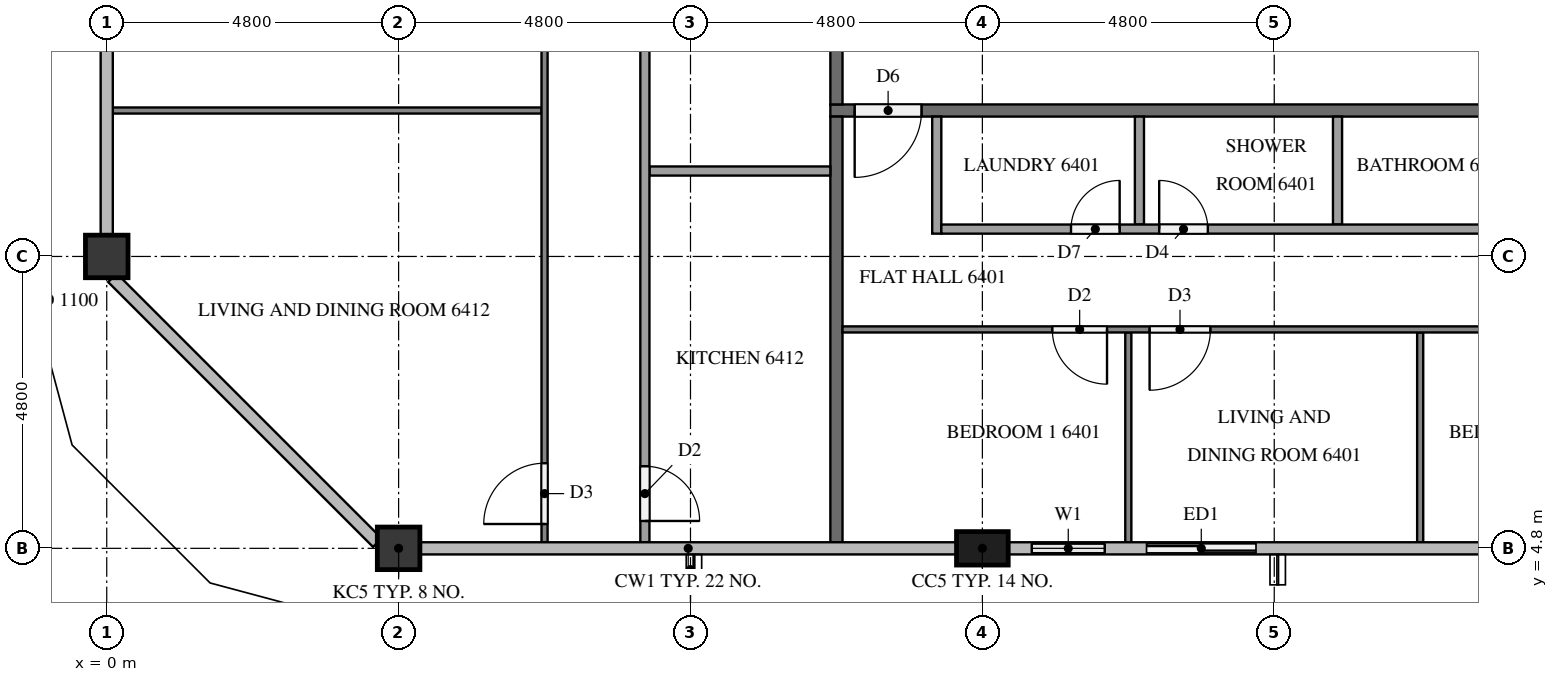
"""IFC4 building model, lengths in metres.
Left out: names, types, materials, properties, quantities, classifications, styles, units other than length and angle.
Written with IfcOpenShell. Run it as: python <this file> out.ifc"""

import sys

from ifc_helpers import new_model, si_unit, direction, frame, frame_2d, origin, origin_2d, place, context, subcontext, project, spatial, rectangle, extrude, element, fill, save


model = new_model("IFC4")
c1 = context("Model", 3, precision=1e-05, world=origin(), true_north=direction((0.0, 1.0)))
c2 = subcontext(c1, "Body", "Model", "MODEL_VIEW")
j1 = project(units=[si_unit("LENGTHUNIT", "METRE"), si_unit("PLANEANGLEUNIT", "RADIAN")], contexts=[c1])
p1 = place(None, origin())
s1 = spatial("IfcSite", under=j1, at=p1, CompositionType="ELEMENT")
p2 = place(p1, origin())
s2 = spatial("IfcBuilding", under=s1, at=p2, CompositionType="ELEMENT")
p3 = place(p2, frame((0.0, 0.0, 245.7)))
s3 = spatial("IfcBuildingStorey", under=s2, at=p3, CompositionType="ELEMENT", Elevation=245.7)
p4 = place(p3, frame((4.8, 4.8, 0.0), z_axis=(0.0, 0.0, 1.0), x_axis=(1.0, 0.0, 0.0)))
e1 = element("IfcColumn", 1, at=p4, inside=s3, PredefinedType="COLUMN", context=c2, shape_type="SweptSolid", body=[
    extrude(rectangle(XDim=0.7, YDim=0.7, at=origin_2d()), origin(), (0.0, 0.0, 1.0), 3.2),
])
p5 = place(p3, frame((14.4, 4.8, 0.0), z_axis=(0.0, 0.0, 1.0), x_axis=(1.0, 0.0, 0.0)))
e2 = element("IfcColumn", 2, at=p5, inside=s3, PredefinedType="COLUMN", context=c2, shape_type="SweptSolid", body=[
    extrude(rectangle(XDim=0.85, YDim=0.55, at=origin_2d()), origin(), (0.0, 0.0, 1.0), 3.2),
])
p6 = place(p3, frame((0.0, 9.6, 0.0), z_axis=(0.0, 0.0, 1.0), x_axis=(1.0, 0.0, 0.0)))
e3 = element("IfcColumn", 3, at=p6, inside=s3, PredefinedType="COLUMN", context=c2, shape_type="SweptSolid", body=[
    extrude(rectangle(XDim=0.7, YDim=0.7, at=origin_2d()), origin(), (0.0, 0.0, 1.0), 3.2),
])
p7 = place(p3, frame((14.825, 4.8, 0.0), z_axis=(0.0, 0.0, 1.0), x_axis=(1.0, 0.0, 0.0)))
e4 = element("IfcWall", 4, at=p7, inside=s3, PredefinedType="SOLIDWALL", context=c2, shape_type="SweptSolid", body=[
    extrude(rectangle(XDim=4.375, YDim=0.15, at=frame_2d((2.188, 0.0))), origin(), (0.0, 0.0, 1.0), 3.2),
])
p8 = place(p7, frame((0.387, 0.0, 0.9)))
e5 = element("IfcOpeningElement", 5, at=p8, cuts=e4, PredefinedType="OPENING", context=c2, shape_type="SweptSolid", body=[
    extrude(rectangle(XDim=1.2, YDim=1.4, at=frame_2d((0.6, 0.7))), frame((0.0, 0.085, 0.0), z_axis=(0.0, -1.0, 0.0), x_axis=(1.0, 0.0, 0.0)), (0.0, 0.0, 1.0), 0.17),
])
p9 = place(p7, frame((2.275, 0.0, 0.0)))
e6 = element("IfcOpeningElement", 6, at=p9, cuts=e4, PredefinedType="OPENING", context=c2, shape_type="SweptSolid", body=[
    extrude(rectangle(XDim=1.8, YDim=2.4, at=frame_2d((0.9, 1.2))), frame((0.0, 0.085, 0.0), z_axis=(0.0, -1.0, 0.0), x_axis=(1.0, 0.0, 0.0)), (0.0, 0.0, 1.0), 0.17),
])
p10 = place(p3, frame((50.5, 12.0, 0.0), z_axis=(0.0, 0.0, 1.0), x_axis=(-1.0, 0.0, 0.0)))
e7 = element("IfcWall", 7, at=p10, inside=s3, PredefinedType="PARTITIONING", context=c2, shape_type="SweptSolid", body=[
    extrude(rectangle(XDim=38.6, YDim=0.2, at=frame_2d((19.3, 0.0))), origin(), (0.0, 0.0, 1.0), 3.2),
])
p11 = place(p10, frame((37.1, 0.0, 0.0)))
e8 = element("IfcOpeningElement", 8, at=p11, cuts=e7, PredefinedType="OPENING", context=c2, shape_type="SweptSolid", body=[
    extrude(rectangle(XDim=1.1, YDim=2.1, at=frame_2d((0.55, 1.05))), frame((0.0, 0.11, 0.0), z_axis=(0.0, -1.0, 0.0), x_axis=(1.0, 0.0, 0.0)), (0.0, 0.0, 1.0), 0.22),
])
p12 = place(p10, frame((17.95, 0.0, 0.0)))
e9 = element("IfcOpeningElement", 9, at=p12, cuts=e7, PredefinedType="OPENING", context=c2, shape_type="SweptSolid", body=[
    extrude(rectangle(XDim=1.0, YDim=2.1, at=frame_2d((0.5, 1.05))), frame((0.0, 0.11, 0.0), z_axis=(0.0, -1.0, 0.0), x_axis=(1.0, 0.0, 0.0)), (0.0, 0.0, 1.0), 0.22),
])
p13 = place(p10, frame((8.35, 0.0, 0.0)))
e10 = element("IfcOpeningElement", 10, at=p13, cuts=e7, PredefinedType="OPENING", context=c2, shape_type="SweptSolid", body=[
    extrude(rectangle(XDim=1.0, YDim=2.1, at=frame_2d((0.5, 1.05))), frame((0.0, 0.11, 0.0), z_axis=(0.0, -1.0, 0.0), x_axis=(1.0, 0.0, 0.0)), (0.0, 0.0, 1.0), 0.22),
])
p14 = place(p3, frame((12.0, 12.1, 0.0), z_axis=(0.0, 0.0, 1.0), x_axis=(0.0, 1.0, 0.0)))
e11 = element("IfcWall", 11, at=p14, inside=s3, PredefinedType="PARTITIONING", context=c2, shape_type="SweptSolid", body=[
    extrude(rectangle(XDim=28.6, YDim=0.2, at=frame_2d((14.3, 0.0))), origin(), (0.0, 0.0, 1.0), 3.2),
])
p15 = place(p14, frame((27.35, 0.0, 0.0)))
e12 = element("IfcOpeningElement", 12, at=p15, cuts=e11, PredefinedType="OPENING", context=c2, shape_type="SweptSolid", body=[
    extrude(rectangle(XDim=1.0, YDim=2.1, at=frame_2d((0.5, 1.05))), frame((0.0, 0.11, 0.0), z_axis=(0.0, -1.0, 0.0), x_axis=(1.0, 0.0, 0.0)), (0.0, 0.0, 1.0), 0.22),
])
p16 = place(p14, frame((17.75, 0.0, 0.0)))
e13 = element("IfcOpeningElement", 13, at=p16, cuts=e11, PredefinedType="OPENING", context=c2, shape_type="SweptSolid", body=[
    extrude(rectangle(XDim=1.0, YDim=2.1, at=frame_2d((0.5, 1.05))), frame((0.0, 0.11, 0.0), z_axis=(0.0, -1.0, 0.0), x_axis=(1.0, 0.0, 0.0)), (0.0, 0.0, 1.0), 0.22),
])
p17 = place(p14, frame((3.35, 0.0, 0.0)))
e14 = element("IfcOpeningElement", 14, at=p17, cuts=e11, PredefinedType="OPENING", context=c2, shape_type="SweptSolid", body=[
    extrude(rectangle(XDim=1.0, YDim=2.1, at=frame_2d((0.5, 1.05))), frame((0.0, 0.11, 0.0), z_axis=(0.0, -1.0, 0.0), x_axis=(1.0, 0.0, 0.0)), (0.0, 0.0, 1.0), 0.22),
])
p18 = place(p3, frame((12.0, 4.9, 0.0), z_axis=(0.0, 0.0, 1.0), x_axis=(0.0, 1.0, 0.0)))
e15 = element("IfcWall", 15, at=p18, inside=s3, PredefinedType="PARTITIONING", context=c2, shape_type="SweptSolid", body=[
    extrude(rectangle(XDim=7.0, YDim=0.2, at=frame_2d((3.5, 0.0))), origin(), (0.0, 0.0, 1.0), 3.2),
])
for number, where, z_axis, x_axis in (
    (16, (16.8, 8.35, 0.0), (0.0, 0.0, 1.0), (0.0, -1.0, 0.0)),
    (17, (21.6, 8.35, 0.0), (0.0, 0.0, 1.0), (0.0, -1.0, 0.0)),
):
    element("IfcWall", number, at=place(p3, frame(where, z_axis=z_axis, x_axis=x_axis)), inside=s3, PredefinedType="PARTITIONING", context=c2, shape_type="SweptSolid", body=[
        extrude(rectangle(XDim=3.45, YDim=0.1, at=frame_2d((1.725, 0.0))), origin(), (0.0, 0.0, 1.0), 3.2),
    ])
p19 = place(p3, frame((31.1, 8.4, 0.0), z_axis=(0.0, 0.0, 1.0), x_axis=(-1.0, 0.0, 0.0)))
e18 = element("IfcWall", 18, at=p19, inside=s3, PredefinedType="PARTITIONING", context=c2, shape_type="SweptSolid", body=[
    extrude(rectangle(XDim=19.0, YDim=0.1, at=frame_2d((9.5, 0.0))), origin(), (0.0, 0.0, 1.0), 3.2),
])
p20 = place(p19, frame((14.65, 0.0, 0.0)))
e19 = element("IfcOpeningElement", 19, at=p20, cuts=e18, PredefinedType="OPENING", context=c2, shape_type="SweptSolid", body=[
    extrude(rectangle(XDim=0.9, YDim=2.1, at=frame_2d((0.45, 1.05))), frame((0.0, 0.06, 0.0), z_axis=(0.0, -1.0, 0.0), x_axis=(1.0, 0.0, 0.0)), (0.0, 0.0, 1.0), 0.12),
])
p21 = place(p19, frame((12.95, 0.0, 0.0)))
e20 = element("IfcOpeningElement", 20, at=p21, cuts=e18, PredefinedType="OPENING", context=c2, shape_type="SweptSolid", body=[
    extrude(rectangle(XDim=1.0, YDim=2.1, at=frame_2d((0.5, 1.05))), frame((0.0, 0.06, 0.0), z_axis=(0.0, -1.0, 0.0), x_axis=(1.0, 0.0, 0.0)), (0.0, 0.0, 1.0), 0.12),
])
p22 = place(p19, frame((5.05, 0.0, 0.0)))
e21 = element("IfcOpeningElement", 21, at=p22, cuts=e18, PredefinedType="OPENING", context=c2, shape_type="SweptSolid", body=[
    extrude(rectangle(XDim=0.9, YDim=2.1, at=frame_2d((0.45, 1.05))), frame((0.0, 0.06, 0.0), z_axis=(0.0, -1.0, 0.0), x_axis=(1.0, 0.0, 0.0)), (0.0, 0.0, 1.0), 0.12),
])
p23 = place(p19, frame((3.45, 0.0, 0.0)))
e22 = element("IfcOpeningElement", 22, at=p23, cuts=e18, PredefinedType="OPENING", context=c2, shape_type="SweptSolid", body=[
    extrude(rectangle(XDim=0.9, YDim=2.1, at=frame_2d((0.45, 1.05))), frame((0.0, 0.06, 0.0), z_axis=(0.0, -1.0, 0.0), x_axis=(1.0, 0.0, 0.0)), (0.0, 0.0, 1.0), 0.12),
])
for number, where, z_axis, x_axis in (
    (23, (16.983, 11.9, 0.0), (0.0, 0.0, 1.0), (0.0, -1.0, 0.0)),
    (24, (20.24, 11.9, 0.0), (0.0, 0.0, 1.0), (0.0, -1.0, 0.0)),
):
    element("IfcWall", number, at=place(p3, frame(where, z_axis=z_axis, x_axis=x_axis)), inside=s3, PredefinedType="PARTITIONING", context=c2, shape_type="SweptSolid", body=[
        extrude(rectangle(XDim=1.775, YDim=0.15, at=frame_2d((0.887, 0.0))), origin(), (0.0, 0.0, 1.0), 3.2),
    ])
p24 = place(p3, frame((13.65, 11.9, 0.0), z_axis=(0.0, 0.0, 1.0), x_axis=(0.0, -1.0, 0.0)))
e25 = element("IfcWall", 25, at=p24, inside=s3, PredefinedType="PARTITIONING", context=c2, shape_type="SweptSolid", body=[
    extrude(rectangle(XDim=1.925, YDim=0.15, at=frame_2d((0.962, 0.0))), origin(), (0.0, 0.0, 1.0), 3.2),
])
p25 = place(p3, frame((13.725, 10.05, 0.0), z_axis=(0.0, 0.0, 1.0), x_axis=(1.0, 0.0, 0.0)))
e26 = element("IfcWall", 26, at=p25, inside=s3, PredefinedType="PARTITIONING", context=c2, shape_type="SweptSolid", body=[
    extrude(rectangle(XDim=17.375, YDim=0.15, at=frame_2d((8.688, 0.0))), origin(), (0.0, 0.0, 1.0), 3.2),
])
p26 = place(p25, frame((2.133, 0.0, 0.0)))
e27 = element("IfcOpeningElement", 27, at=p26, cuts=e26, PredefinedType="OPENING", context=c2, shape_type="SweptSolid", body=[
    extrude(rectangle(XDim=0.8, YDim=2.1, at=frame_2d((0.4, 1.05))), frame((0.0, 0.085, 0.0), z_axis=(0.0, -1.0, 0.0), x_axis=(1.0, 0.0, 0.0)), (0.0, 0.0, 1.0), 0.17),
])
p27 = place(p25, frame((3.583, 0.0, 0.0)))
e28 = element("IfcOpeningElement", 28, at=p27, cuts=e26, PredefinedType="OPENING", context=c2, shape_type="SweptSolid", body=[
    extrude(rectangle(XDim=0.8, YDim=2.1, at=frame_2d((0.4, 1.05))), frame((0.0, 0.085, 0.0), z_axis=(0.0, -1.0, 0.0), x_axis=(1.0, 0.0, 0.0)), (0.0, 0.0, 1.0), 0.17),
])
p28 = place(p25, frame((9.635, 0.0, 0.0)))
e29 = element("IfcOpeningElement", 29, at=p28, cuts=e26, PredefinedType="OPENING", context=c2, shape_type="SweptSolid", body=[
    extrude(rectangle(XDim=0.9, YDim=2.1, at=frame_2d((0.45, 1.05))), frame((0.0, 0.085, 0.0), z_axis=(0.0, -1.0, 0.0), x_axis=(1.0, 0.0, 0.0)), (0.0, 0.0, 1.0), 0.17),
])
p29 = place(p25, frame((11.184, 0.0, 0.0)))
e30 = element("IfcOpeningElement", 30, at=p29, cuts=e26, PredefinedType="OPENING", context=c2, shape_type="SweptSolid", body=[
    extrude(rectangle(XDim=0.9, YDim=2.1, at=frame_2d((0.45, 1.05))), frame((0.0, 0.085, 0.0), z_axis=(0.0, -1.0, 0.0), x_axis=(1.0, 0.0, 0.0)), (0.0, 0.0, 1.0), 0.17),
])
p30 = place(p3, frame((7.15, 12.0, 0.0), z_axis=(0.0, 0.0, 1.0), x_axis=(-1.0, 0.0, 0.0)))
e31 = element("IfcWall", 31, at=p30, inside=s3, PredefinedType="PARTITIONING", context=c2, shape_type="SweptSolid", body=[
    extrude(rectangle(XDim=7.05, YDim=0.1, at=frame_2d((3.525, 0.0))), origin(), (0.0, 0.0, 1.0), 3.2),
])
p31 = place(p3, frame((7.2, 4.9, 0.0), z_axis=(0.0, 0.0, 1.0), x_axis=(0.0, 1.0, 0.0)))
e32 = element("IfcWall", 32, at=p31, inside=s3, PredefinedType="PARTITIONING", context=c2, shape_type="SweptSolid", body=[
    extrude(rectangle(XDim=11.8, YDim=0.1, at=frame_2d((5.9, 0.0))), origin(), (0.0, 0.0, 1.0), 3.2),
])
p32 = place(p31, frame((10.6, 0.0, 0.0)))
e33 = element("IfcOpeningElement", 33, at=p32, cuts=e32, PredefinedType="OPENING", context=c2, shape_type="SweptSolid", body=[
    extrude(rectangle(XDim=0.9, YDim=2.1, at=frame_2d((0.45, 1.05))), frame((0.0, 0.06, 0.0), z_axis=(0.0, -1.0, 0.0), x_axis=(1.0, 0.0, 0.0)), (0.0, 0.0, 1.0), 0.12),
])
p33 = place(p31, frame((0.3, 0.0, 0.0)))
e34 = element("IfcOpeningElement", 34, at=p33, cuts=e32, PredefinedType="OPENING", context=c2, shape_type="SweptSolid", body=[
    extrude(rectangle(XDim=1.0, YDim=2.1, at=frame_2d((0.5, 1.05))), frame((0.0, 0.06, 0.0), z_axis=(0.0, -1.0, 0.0), x_axis=(1.0, 0.0, 0.0)), (0.0, 0.0, 1.0), 0.12),
])
p34 = place(p3, frame((11.9, 11.005, 0.0), z_axis=(0.0, 0.0, 1.0), x_axis=(-1.0, 0.0, 0.0)))
e35 = element("IfcWall", 35, at=p34, inside=s3, PredefinedType="PARTITIONING", context=c2, shape_type="SweptSolid", body=[
    extrude(rectangle(XDim=2.975, YDim=0.15, at=frame_2d((1.487, 0.0))), origin(), (0.0, 0.0, 1.0), 3.2),
])
p35 = place(p3, frame((8.85, 15.075, 0.0), z_axis=(0.0, 0.0, 1.0), x_axis=(0.0, -1.0, 0.0)))
e36 = element("IfcWall", 36, at=p35, inside=s3, PredefinedType="PARTITIONING", context=c2, shape_type="SweptSolid", body=[
    extrude(rectangle(XDim=10.175, YDim=0.15, at=frame_2d((5.087, 0.0))), origin(), (0.0, 0.0, 1.0), 3.2),
])
p36 = place(p35, frame((0.3, 0.0, 0.0)))
e37 = element("IfcOpeningElement", 37, at=p36, cuts=e36, PredefinedType="OPENING", context=c2, shape_type="SweptSolid", body=[
    extrude(rectangle(XDim=0.8, YDim=2.1, at=frame_2d((0.4, 1.05))), frame((0.0, 0.085, 0.0), z_axis=(0.0, -1.0, 0.0), x_axis=(1.0, 0.0, 0.0)), (0.0, 0.0, 1.0), 0.17),
])
p37 = place(p35, frame((8.925, 0.0, 0.0)))
e38 = element("IfcOpeningElement", 38, at=p37, cuts=e36, PredefinedType="OPENING", context=c2, shape_type="SweptSolid", body=[
    extrude(rectangle(XDim=0.9, YDim=2.1, at=frame_2d((0.45, 1.05))), frame((0.0, 0.085, 0.0), z_axis=(0.0, -1.0, 0.0), x_axis=(1.0, 0.0, 0.0)), (0.0, 0.0, 1.0), 0.17),
])
p38 = place(p8, origin())
e39 = element("IfcWindow", 39, at=p38, inside=s3, PartitioningType="SINGLE_PANEL", PredefinedType="WINDOW", context=c2, shape_type="SweptSolid", body=[
    extrude(rectangle(XDim=1.2, YDim=1.4, at=frame_2d((0.6, 0.7))), frame((0.0, 0.03, 0.0), z_axis=(0.0, -1.0, 0.0), x_axis=(1.0, 0.0, 0.0)), (0.0, 0.0, 1.0), 0.06),
])
fill(e5, e39)
p39 = place(p9, origin())
e40 = element("IfcDoor", 40, at=p39, inside=s3, OperationType="SLIDING_TO_LEFT", PredefinedType="DOOR", context=c2, shape_type="SweptSolid", body=[
    extrude(rectangle(XDim=1.8, YDim=2.4, at=frame_2d((0.9, 1.2))), frame((0.0, 0.025, 0.0), z_axis=(0.0, -1.0, 0.0), x_axis=(1.0, 0.0, 0.0)), (0.0, 0.0, 1.0), 0.05),
])
fill(e6, e40)
p40 = place(p11, origin())
e41 = element("IfcDoor", 41, at=p40, inside=s3, OperationType="SINGLE_SWING_RIGHT", PredefinedType="DOOR", context=c2, shape_type="SweptSolid", body=[
    extrude(rectangle(XDim=1.1, YDim=2.1, at=frame_2d((0.55, 1.05))), frame((0.0, 0.025, 0.0), z_axis=(0.0, -1.0, 0.0), x_axis=(1.0, 0.0, 0.0)), (0.0, 0.0, 1.0), 0.05),
])
fill(e8, e41)
p41 = place(p20, origin())
e42 = element("IfcDoor", 42, at=p41, inside=s3, OperationType="SINGLE_SWING_LEFT", PredefinedType="DOOR", context=c2, shape_type="SweptSolid", body=[
    extrude(rectangle(XDim=0.9, YDim=2.1, at=frame_2d((0.45, 1.05))), frame((0.0, 0.025, 0.0), z_axis=(0.0, -1.0, 0.0), x_axis=(1.0, 0.0, 0.0)), (0.0, 0.0, 1.0), 0.05),
])
fill(e19, e42)
p42 = place(p21, origin())
e43 = element("IfcDoor", 43, at=p42, inside=s3, OperationType="SINGLE_SWING_RIGHT", PredefinedType="DOOR", context=c2, shape_type="SweptSolid", body=[
    extrude(rectangle(XDim=1.0, YDim=2.1, at=frame_2d((0.5, 1.05))), frame((0.0, 0.025, 0.0), z_axis=(0.0, -1.0, 0.0), x_axis=(1.0, 0.0, 0.0)), (0.0, 0.0, 1.0), 0.05),
])
fill(e20, e43)
p43 = place(p26, origin())
e44 = element("IfcDoor", 44, at=p43, inside=s3, OperationType="SINGLE_SWING_RIGHT", PredefinedType="DOOR", context=c2, shape_type="SweptSolid", body=[
    extrude(rectangle(XDim=0.8, YDim=2.1, at=frame_2d((0.4, 1.05))), frame((0.0, 0.025, 0.0), z_axis=(0.0, -1.0, 0.0), x_axis=(1.0, 0.0, 0.0)), (0.0, 0.0, 1.0), 0.05),
])
fill(e27, e44)
p44 = place(p27, origin())
e45 = element("IfcDoor", 45, at=p44, inside=s3, OperationType="SINGLE_SWING_LEFT", PredefinedType="DOOR", context=c2, shape_type="SweptSolid", body=[
    extrude(rectangle(XDim=0.8, YDim=2.1, at=frame_2d((0.4, 1.05))), frame((0.0, 0.025, 0.0), z_axis=(0.0, -1.0, 0.0), x_axis=(1.0, 0.0, 0.0)), (0.0, 0.0, 1.0), 0.05),
])
fill(e28, e45)
p45 = place(p33, origin())
e46 = element("IfcDoor", 46, at=p45, inside=s3, OperationType="SINGLE_SWING_LEFT", PredefinedType="DOOR", context=c2, shape_type="SweptSolid", body=[
    extrude(rectangle(XDim=1.0, YDim=2.1, at=frame_2d((0.5, 1.05))), frame((0.0, 0.025, 0.0), z_axis=(0.0, -1.0, 0.0), x_axis=(1.0, 0.0, 0.0)), (0.0, 0.0, 1.0), 0.05),
])
fill(e34, e46)
p46 = place(p37, origin())
e47 = element("IfcDoor", 47, at=p46, inside=s3, OperationType="SINGLE_SWING_RIGHT", PredefinedType="DOOR", context=c2, shape_type="SweptSolid", body=[
    extrude(rectangle(XDim=0.9, YDim=2.1, at=frame_2d((0.45, 1.05))), frame((0.0, 0.025, 0.0), z_axis=(0.0, -1.0, 0.0), x_axis=(1.0, 0.0, 0.0)), (0.0, 0.0, 1.0), 0.05),
])
fill(e38, e47)
save(model, sys.argv[1])
